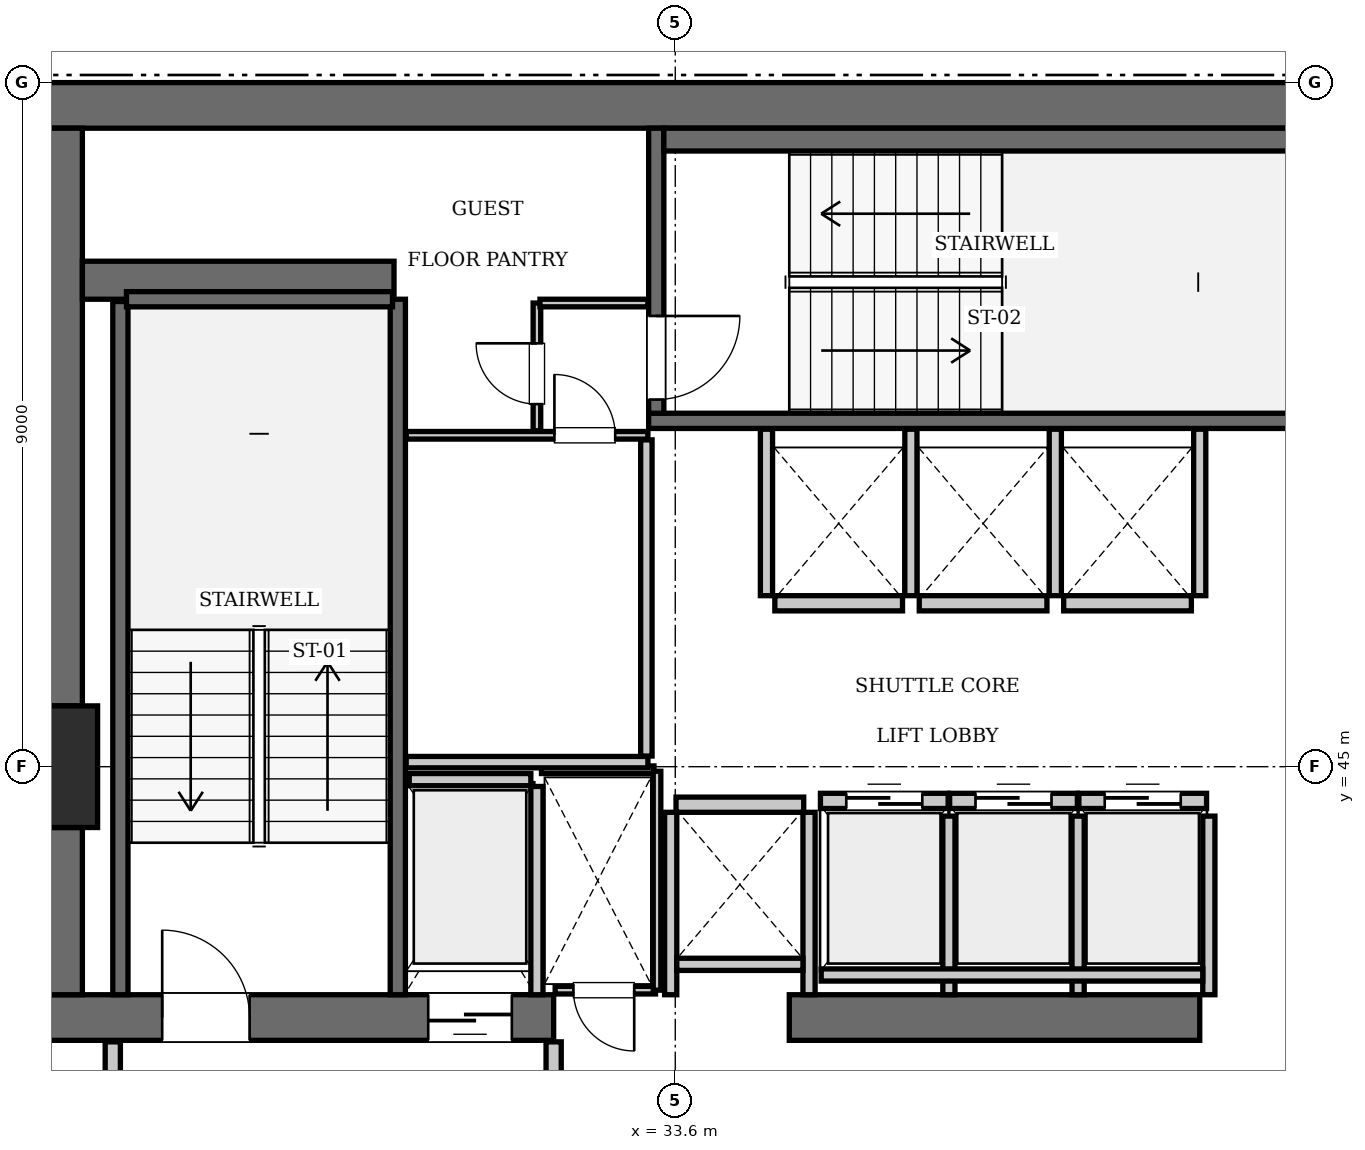
"""IFC4 building model, lengths in metres.
Left out: names, types, materials, properties, quantities, classifications, styles, units other than length and angle.
Written with IfcOpenShell. Run it as: python <this file> out.ifc"""

import sys

from ifc_helpers import new_model, si_unit, direction, frame, frame_2d, origin, origin_2d, place, context, subcontext, project, spatial, rectangle, extrude, element, fill, save


model = new_model("IFC4")
c1 = context("Model", 3, precision=1e-05, world=origin(), true_north=direction((0.0, 1.0)))
c2 = subcontext(c1, "Body", "Model", "MODEL_VIEW")
j1 = project(units=[si_unit("LENGTHUNIT", "METRE"), si_unit("PLANEANGLEUNIT", "RADIAN")], contexts=[c1])
p1 = place(None, origin())
s1 = spatial("IfcSite", under=j1, at=p1, CompositionType="ELEMENT")
p2 = place(p1, origin())
s2 = spatial("IfcBuilding", under=s1, at=p2, CompositionType="ELEMENT")
p3 = place(p2, frame((0.0, 0.0, 297.15)))
s3 = spatial("IfcBuildingStorey", under=s2, at=p3, CompositionType="ELEMENT", Elevation=297.15)
p4 = place(p3, frame((25.2, 45.0, 0.0), z_axis=(0.0, 0.0, 1.0), x_axis=(1.0, 0.0, 0.0)))
e1 = element("IfcColumn", 1, at=p4, inside=s3, PredefinedType="COLUMN", context=c2, shape_type="SweptSolid", body=[
    extrude(rectangle(XDim=1.6, YDim=1.6, at=origin_2d()), origin(), (0.0, 0.0, 1.0), 3.85),
])
p5 = place(p3, frame((25.2, 53.7, 0.0), z_axis=(0.0, 0.0, 1.0), x_axis=(1.0, 0.0, 0.0)))
e2 = element("IfcWall", 2, at=p5, inside=s3, PredefinedType="SHEAR", context=c2, shape_type="SweptSolid", body=[
    extrude(rectangle(XDim=25.2, YDim=0.6, at=frame_2d((12.6, 0.0))), origin(), (0.0, 0.0, 1.0), 3.85),
])
p6 = place(p3, frame((25.2, 41.7, 0.0), z_axis=(0.0, 0.0, 1.0), x_axis=(1.0, 0.0, 0.0)))
e3 = element("IfcWall", 3, at=p6, inside=s3, PredefinedType="SHEAR", context=c2, shape_type="SweptSolid", body=[
    extrude(rectangle(XDim=6.8, YDim=0.6, at=frame_2d((3.4, 0.0))), origin(), (0.0, 0.0, 1.0), 3.85),
])
p7 = place(p6, frame((1.65, 0.0, 0.0)))
e4 = element("IfcOpeningElement", 4, at=p7, cuts=e3, PredefinedType="OPENING", context=c2, shape_type="SweptSolid", body=[
    extrude(rectangle(XDim=1.15, YDim=2.15, at=frame_2d((0.575, 1.075))), frame((0.0, 0.31, 0.0), z_axis=(0.0, -1.0, 0.0), x_axis=(1.0, 0.0, 0.0)), (0.0, 0.0, 1.0), 0.62),
])
p8 = place(p6, frame((5.15, 0.0, 0.0)))
e5 = element("IfcOpeningElement", 5, at=p8, cuts=e3, PredefinedType="OPENING", context=c2, shape_type="SweptSolid", body=[
    extrude(rectangle(XDim=1.1, YDim=2.2, at=frame_2d((0.55, 1.1))), frame((0.0, 0.31, 0.0), z_axis=(0.0, -1.0, 0.0), x_axis=(1.0, 0.0, 0.0)), (0.0, 0.0, 1.0), 0.62),
])
p9 = place(p3, frame((35.1, 41.7, 0.0), z_axis=(0.0, 0.0, 1.0), x_axis=(1.0, 0.0, 0.0)))
e6 = element("IfcWall", 6, at=p9, inside=s3, PredefinedType="SHEAR", context=c2, shape_type="SweptSolid", body=[
    extrude(rectangle(XDim=5.4, YDim=0.6, at=frame_2d((2.7, 0.0))), origin(), (0.0, 0.0, 1.0), 3.85),
])
p10 = place(p3, frame((25.5, 42.0, 0.0), z_axis=(0.0, 0.0, 1.0), x_axis=(0.0, 1.0, 0.0)))
e7 = element("IfcWall", 7, at=p10, inside=s3, PredefinedType="SHEAR", context=c2, shape_type="SweptSolid", body=[
    extrude(rectangle(XDim=2.2, YDim=0.6, at=frame_2d((1.1, 0.0))), origin(), (0.0, 0.0, 1.0), 3.85),
])
p11 = place(p3, frame((25.5, 45.8, 0.0), z_axis=(0.0, 0.0, 1.0), x_axis=(0.0, 1.0, 0.0)))
e8 = element("IfcWall", 8, at=p11, inside=s3, PredefinedType="SHEAR", context=c2, shape_type="SweptSolid", body=[
    extrude(rectangle(XDim=7.6, YDim=0.6, at=frame_2d((3.8, 0.0))), origin(), (0.0, 0.0, 1.0), 3.85),
])
p12 = place(p3, frame((25.8, 51.4, 0.0), z_axis=(0.0, 0.0, 1.0), x_axis=(1.0, 0.0, 0.0)))
e9 = element("IfcWall", 9, at=p12, inside=s3, PredefinedType="SHEAR", context=c2, shape_type="SweptSolid", body=[
    extrude(rectangle(XDim=4.1, YDim=0.5, at=frame_2d((2.05, 0.0))), origin(), (0.0, 0.0, 1.0), 3.85),
])
p13 = place(p3, frame((29.95, 42.0, 0.0), z_axis=(0.0, 0.0, 1.0), x_axis=(0.0, 1.0, 0.0)))
e10 = element("IfcWall", 10, at=p13, inside=s3, PredefinedType="SOLIDWALL", context=c2, shape_type="SweptSolid", body=[
    extrude(rectangle(XDim=9.15, YDim=0.2, at=frame_2d((4.575, 0.0))), origin(), (0.0, 0.0, 1.0), 3.61),
])
p14 = place(p3, frame((26.3, 42.0, 0.0), z_axis=(0.0, 0.0, 1.0), x_axis=(0.0, 1.0, 0.0)))
e11 = element("IfcWall", 11, at=p14, inside=s3, PredefinedType="SOLIDWALL", context=c2, shape_type="SweptSolid", body=[
    extrude(rectangle(XDim=9.12, YDim=0.2, at=frame_2d((4.56, 0.0))), origin(), (0.0, 0.0, 1.0), 3.61),
])
p15 = place(p3, frame((26.38, 51.15, 0.0), z_axis=(0.0, 0.0, 1.0), x_axis=(1.0, 0.0, 0.0)))
e12 = element("IfcWall", 12, at=p15, inside=s3, PredefinedType="SOLIDWALL", context=c2, shape_type="SweptSolid", body=[
    extrude(rectangle(XDim=3.5, YDim=0.2, at=frame_2d((1.75, 0.0))), origin(), (0.0, 0.0, 1.0), 3.61),
])
p16 = place(p3, frame((33.25, 49.55, 0.0), z_axis=(0.0, 0.0, 1.0), x_axis=(1.0, 0.0, 0.0)))
e13 = element("IfcWall", 13, at=p16, inside=s3, PredefinedType="SOLIDWALL", context=c2, shape_type="SweptSolid", body=[
    extrude(rectangle(XDim=9.1, YDim=0.2, at=frame_2d((4.55, 0.0))), origin(), (0.0, 0.0, 1.0), 3.61),
])
p17 = place(p3, frame((33.35, 49.65, 0.0), z_axis=(0.0, 0.0, 1.0), x_axis=(0.0, 1.0, 0.0)))
e14 = element("IfcWall", 14, at=p17, inside=s3, PredefinedType="SOLIDWALL", context=c2, shape_type="SweptSolid", body=[
    extrude(rectangle(XDim=3.75, YDim=0.2, at=frame_2d((1.875, 0.0))), origin(), (0.0, 0.0, 1.0), 3.61),
])
p18 = place(p17, frame((0.18, 0.0, 0.0)))
e15 = element("IfcOpeningElement", 15, at=p18, cuts=e14, PredefinedType="OPENING", context=c2, shape_type="SweptSolid", body=[
    extrude(rectangle(XDim=1.1, YDim=2.15, at=frame_2d((0.55, 1.075))), frame((0.0, 0.11, 0.0), z_axis=(0.0, -1.0, 0.0), x_axis=(1.0, 0.0, 0.0)), (0.0, 0.0, 1.0), 0.22),
])
p19 = place(p3, frame((33.45, 53.25, 0.0), z_axis=(0.0, 0.0, 1.0), x_axis=(1.0, 0.0, 0.0)))
e16 = element("IfcWall", 16, at=p19, inside=s3, PredefinedType="SOLIDWALL", context=c2, shape_type="SweptSolid", body=[
    extrude(rectangle(XDim=8.7, YDim=0.3, at=frame_2d((4.35, 0.0))), origin(), (0.0, 0.0, 1.0), 3.61),
])
p20 = place(p3, frame((35.51, 44.55, 0.0), z_axis=(0.0, 0.0, 1.0), x_axis=(1.0, 0.0, 0.0)))
e17 = element("IfcWall", 17, at=p20, inside=s3, PredefinedType="SOLIDWALL", context=c2, shape_type="SweptSolid", body=[
    extrude(rectangle(XDim=1.68, YDim=0.2, at=frame_2d((0.84, 0.0))), origin(), (0.0, 0.0, 1.0), 3.61),
])
p21 = place(p20, frame((0.34, 0.0, 0.0)))
e18 = element("IfcOpeningElement", 18, at=p21, cuts=e17, PredefinedType="OPENING", context=c2, shape_type="SweptSolid", body=[
    extrude(rectangle(XDim=1.0, YDim=2.15, at=frame_2d((0.5, 1.075))), frame((0.0, 0.11, 0.0), z_axis=(0.0, -1.0, 0.0), x_axis=(1.0, 0.0, 0.0)), (0.0, 0.0, 1.0), 0.22),
])
p22 = place(p3, frame((37.21, 44.55, 0.0), z_axis=(0.0, 0.0, 1.0), x_axis=(1.0, 0.0, 0.0)))
e19 = element("IfcWall", 19, at=p22, inside=s3, PredefinedType="SOLIDWALL", context=c2, shape_type="SweptSolid", body=[
    extrude(rectangle(XDim=1.68, YDim=0.2, at=frame_2d((0.84, 0.0))), origin(), (0.0, 0.0, 1.0), 3.61),
])
p23 = place(p22, frame((0.34, 0.0, 0.0)))
e20 = element("IfcOpeningElement", 20, at=p23, cuts=e19, PredefinedType="OPENING", context=c2, shape_type="SweptSolid", body=[
    extrude(rectangle(XDim=1.0, YDim=2.15, at=frame_2d((0.5, 1.075))), frame((0.0, 0.11, 0.0), z_axis=(0.0, -1.0, 0.0), x_axis=(1.0, 0.0, 0.0)), (0.0, 0.0, 1.0), 0.22),
])
p24 = place(p3, frame((38.91, 44.55, 0.0), z_axis=(0.0, 0.0, 1.0), x_axis=(1.0, 0.0, 0.0)))
e21 = element("IfcWall", 21, at=p24, inside=s3, PredefinedType="SOLIDWALL", context=c2, shape_type="SweptSolid", body=[
    extrude(rectangle(XDim=1.68, YDim=0.2, at=frame_2d((0.84, 0.0))), origin(), (0.0, 0.0, 1.0), 3.61),
])
p25 = place(p24, frame((0.34, 0.0, 0.0)))
e22 = element("IfcOpeningElement", 22, at=p25, cuts=e21, PredefinedType="OPENING", context=c2, shape_type="SweptSolid", body=[
    extrude(rectangle(XDim=1.0, YDim=2.15, at=frame_2d((0.5, 1.075))), frame((0.0, 0.11, 0.0), z_axis=(0.0, -1.0, 0.0), x_axis=(1.0, 0.0, 0.0)), (0.0, 0.0, 1.0), 0.22),
])
p26 = place(p3, frame((34.91, 47.15, 0.0), z_axis=(0.0, 0.0, 1.0), x_axis=(1.0, 0.0, 0.0)))
e23 = element("IfcWall", 23, at=p26, inside=s3, PredefinedType="SOLIDWALL", context=c2, shape_type="SweptSolid", body=[
    extrude(rectangle(XDim=1.68, YDim=0.2, at=frame_2d((0.84, 0.0))), origin(), (0.0, 0.0, 1.0), 3.61),
])
for number, where, z_axis, x_axis in (
    (24, (36.81, 47.15, 0.0), (0.0, 0.0, 1.0), (1.0, 0.0, 0.0)),
    (25, (38.71, 47.15, 0.0), (0.0, 0.0, 1.0), (1.0, 0.0, 0.0)),
    (26, (33.61, 44.5, 0.0), (0.0, 0.0, 1.0), (1.0, 0.0, 0.0)),
):
    element("IfcWall", number, at=place(p3, frame(where, z_axis=z_axis, x_axis=x_axis)), inside=s3, PredefinedType="SOLIDWALL", context=c2, shape_type="SweptSolid", body=[
        extrude(rectangle(XDim=1.68, YDim=0.2, at=frame_2d((0.84, 0.0))), origin(), (0.0, 0.0, 1.0), 3.61),
    ])
p27 = place(p3, frame((30.1, 44.83, 0.0), z_axis=(0.0, 0.0, 1.0), x_axis=(1.0, 0.0, 0.0)))
e27 = element("IfcWall", 27, at=p27, inside=s3, PredefinedType="SOLIDWALL", context=c2, shape_type="SweptSolid", body=[
    extrude(rectangle(XDim=1.6, YDim=0.16, at=frame_2d((0.8, 0.0))), origin(), (0.0, 0.0, 1.0), 3.61),
])
p28 = place(p3, frame((31.78, 42.0, 0.0), z_axis=(0.0, 0.0, 1.0), x_axis=(0.0, 1.0, 0.0)))
e28 = element("IfcWall", 28, at=p28, inside=s3, PredefinedType="SOLIDWALL", context=c2, shape_type="SweptSolid", body=[
    extrude(rectangle(XDim=2.74, YDim=0.16, at=frame_2d((1.37, 0.0))), origin(), (0.0, 0.0, 1.0), 3.61),
])
for number, where, z_axis, x_axis in (
    (29, (37.2, 42.0, 0.0), (0.0, 0.0, 1.0), (0.0, 1.0, 0.0)),
    (30, (38.9, 42.0, 0.0), (0.0, 0.0, 1.0), (0.0, 1.0, 0.0)),
    (31, (40.62, 42.0, 0.0), (0.0, 0.0, 1.0), (0.0, 1.0, 0.0)),
):
    element("IfcWall", number, at=place(p3, frame(where, z_axis=z_axis, x_axis=x_axis)), inside=s3, PredefinedType="SOLIDWALL", context=c2, shape_type="SweptSolid", body=[
        extrude(rectangle(XDim=2.35, YDim=0.16, at=frame_2d((1.175, 0.0))), origin(), (0.0, 0.0, 1.0), 3.61),
    ])
p29 = place(p3, frame((35.52, 42.26, 0.0), z_axis=(0.0, 0.0, 1.0), x_axis=(1.0, 0.0, 0.0)))
e32 = element("IfcWall", 32, at=p29, inside=s3, PredefinedType="SOLIDWALL", context=c2, shape_type="SweptSolid", body=[
    extrude(rectangle(XDim=5.02, YDim=0.16, at=frame_2d((2.51, 0.0))), origin(), (0.0, 0.0, 1.0), 3.61),
])
for number, where, z_axis, x_axis in (
    (33, (34.8, 47.25, 0.0), (0.0, 0.0, 1.0), (0.0, 1.0, 0.0)),
    (34, (36.7, 47.25, 0.0), (0.0, 0.0, 1.0), (0.0, 1.0, 0.0)),
    (35, (38.6, 47.25, 0.0), (0.0, 0.0, 1.0), (0.0, 1.0, 0.0)),
    (36, (40.5, 47.25, 0.0), (0.0, 0.0, 1.0), (0.0, 1.0, 0.0)),
):
    element("IfcWall", number, at=place(p3, frame(where, z_axis=z_axis, x_axis=x_axis)), inside=s3, PredefinedType="SOLIDWALL", context=c2, shape_type="SweptSolid", body=[
        extrude(rectangle(XDim=2.19, YDim=0.16, at=frame_2d((1.095, 0.0))), origin(), (0.0, 0.0, 1.0), 3.61),
    ])
for number, where, z_axis, x_axis in (
    (37, (33.54, 42.0, 0.0), (0.0, 0.0, 1.0), (0.0, 1.0, 0.0)),
    (38, (35.36, 42.0, 0.0), (0.0, 0.0, 1.0), (0.0, 1.0, 0.0)),
):
    element("IfcWall", number, at=place(p3, frame(where, z_axis=z_axis, x_axis=x_axis)), inside=s3, PredefinedType="SOLIDWALL", context=c2, shape_type="SweptSolid", body=[
        extrude(rectangle(XDim=2.4, YDim=0.16, at=frame_2d((1.2, 0.0))), origin(), (0.0, 0.0, 1.0), 3.61),
    ])
p30 = place(p3, frame((33.62, 42.4, 0.0), z_axis=(0.0, 0.0, 1.0), x_axis=(1.0, 0.0, 0.0)))
e39 = element("IfcWall", 39, at=p30, inside=s3, PredefinedType="SOLIDWALL", context=c2, shape_type="SweptSolid", body=[
    extrude(rectangle(XDim=1.66, YDim=0.16, at=frame_2d((0.83, 0.0))), origin(), (0.0, 0.0, 1.0), 3.61),
])
for number, where, z_axis, x_axis in (
    (40, (26.2, 38.31, 0.0), (0.0, 0.0, 1.0), (0.0, 1.0, 0.0)),
    (41, (32.0, 38.31, 0.0), (0.0, 0.0, 1.0), (0.0, 1.0, 0.0)),
):
    element("IfcWall", number, at=place(p3, frame(where, z_axis=z_axis, x_axis=x_axis)), inside=s3, PredefinedType="PARTITIONING", context=c2, shape_type="SweptSolid", body=[
        extrude(rectangle(XDim=3.07, YDim=0.2, at=frame_2d((1.535, 0.0))), origin(), (0.0, 0.0, 1.0), 3.61),
    ])
p31 = place(p3, frame((32.02, 42.06, 0.0), z_axis=(0.0, 0.0, 1.0), x_axis=(1.0, 0.0, 0.0)))
e42 = element("IfcWall", 42, at=p31, inside=s3, PredefinedType="PARTITIONING", context=c2, shape_type="SweptSolid", body=[
    extrude(rectangle(XDim=1.32, YDim=0.1, at=frame_2d((0.66, 0.0))), origin(), (0.0, 0.0, 1.0), 3.61),
])
p32 = place(p31, frame((0.24, 0.0, 0.0)))
e43 = element("IfcOpeningElement", 43, at=p32, cuts=e42, PredefinedType="OPENING", context=c2, shape_type="SweptSolid", body=[
    extrude(rectangle(XDim=0.8, YDim=2.05, at=frame_2d((0.4, 1.025))), frame((0.0, 0.06, 0.0), z_axis=(0.0, -1.0, 0.0), x_axis=(1.0, 0.0, 0.0)), (0.0, 0.0, 1.0), 0.12),
])
p33 = place(p3, frame((31.84, 44.96, 0.0), z_axis=(0.0, 0.0, 1.0), x_axis=(1.0, 0.0, 0.0)))
e44 = element("IfcWall", 44, at=p33, inside=s3, PredefinedType="PARTITIONING", context=c2, shape_type="SweptSolid", body=[
    extrude(rectangle(XDim=1.48, YDim=0.1, at=frame_2d((0.74, 0.0))), origin(), (0.0, 0.0, 1.0), 3.61),
])
p34 = place(p3, frame((33.36, 42.06, 0.0), z_axis=(0.0, 0.0, 1.0), x_axis=(0.0, 1.0, 0.0)))
e45 = element("IfcWall", 45, at=p34, inside=s3, PredefinedType="PARTITIONING", context=c2, shape_type="SweptSolid", body=[
    extrude(rectangle(XDim=2.88, YDim=0.1, at=frame_2d((1.44, 0.0))), origin(), (0.0, 0.0, 1.0), 3.61),
])
p35 = place(p3, frame((30.06, 45.06, 0.0), z_axis=(0.0, 0.0, 1.0), x_axis=(1.0, 0.0, 0.0)))
e46 = element("IfcWall", 46, at=p35, inside=s3, PredefinedType="PARTITIONING", context=c2, shape_type="SweptSolid", body=[
    extrude(rectangle(XDim=3.18, YDim=0.15, at=frame_2d((1.59, 0.0))), origin(), (0.0, 0.0, 1.0), 3.61),
])
p36 = place(p3, frame((33.22, 45.14, 0.0), z_axis=(0.0, 0.0, 1.0), x_axis=(0.0, 1.0, 0.0)))
e47 = element("IfcWall", 47, at=p36, inside=s3, PredefinedType="PARTITIONING", context=c2, shape_type="SweptSolid", body=[
    extrude(rectangle(XDim=4.16, YDim=0.15, at=frame_2d((2.08, 0.0))), origin(), (0.0, 0.0, 1.0), 3.61),
])
p37 = place(p3, frame((30.06, 49.36, 0.0), z_axis=(0.0, 0.0, 1.0), x_axis=(1.0, 0.0, 0.0)))
e48 = element("IfcWall", 48, at=p37, inside=s3, PredefinedType="PARTITIONING", context=c2, shape_type="SweptSolid", body=[
    extrude(rectangle(XDim=3.18, YDim=0.1, at=frame_2d((1.59, 0.0))), origin(), (0.0, 0.0, 1.0), 3.61),
])
p38 = place(p37, frame((1.95, 0.0, 0.0)))
e49 = element("IfcOpeningElement", 49, at=p38, cuts=e48, PredefinedType="OPENING", context=c2, shape_type="SweptSolid", body=[
    extrude(rectangle(XDim=0.8, YDim=2.05, at=frame_2d((0.4, 1.025))), frame((0.0, 0.06, 0.0), z_axis=(0.0, -1.0, 0.0), x_axis=(1.0, 0.0, 0.0)), (0.0, 0.0, 1.0), 0.12),
])
p39 = place(p3, frame((31.78, 49.42, 0.0), z_axis=(0.0, 0.0, 1.0), x_axis=(0.0, 1.0, 0.0)))
e50 = element("IfcWall", 50, at=p39, inside=s3, PredefinedType="PARTITIONING", context=c2, shape_type="SweptSolid", body=[
    extrude(rectangle(XDim=1.68, YDim=0.1, at=frame_2d((0.84, 0.0))), origin(), (0.0, 0.0, 1.0), 3.61),
])
p40 = place(p39, frame((0.35, 0.0, 0.0)))
e51 = element("IfcOpeningElement", 51, at=p40, cuts=e50, PredefinedType="OPENING", context=c2, shape_type="SweptSolid", body=[
    extrude(rectangle(XDim=0.8, YDim=2.05, at=frame_2d((0.4, 1.025))), frame((0.0, 0.06, 0.0), z_axis=(0.0, -1.0, 0.0), x_axis=(1.0, 0.0, 0.0)), (0.0, 0.0, 1.0), 0.12),
])
p41 = place(p3, frame((31.82, 51.1, 0.0), z_axis=(0.0, 0.0, 1.0), x_axis=(1.0, 0.0, 0.0)))
e52 = element("IfcWall", 52, at=p41, inside=s3, PredefinedType="PARTITIONING", context=c2, shape_type="SweptSolid", body=[
    extrude(rectangle(XDim=1.42, YDim=0.1, at=frame_2d((0.71, 0.0))), origin(), (0.0, 0.0, 1.0), 3.61),
])
p42 = place(p7, origin())
e53 = element("IfcDoor", 53, at=p42, inside=s3, OperationType="SINGLE_SWING_LEFT", PredefinedType="DOOR", context=c2, shape_type="SweptSolid", body=[
    extrude(rectangle(XDim=1.15, YDim=2.15, at=frame_2d((0.575, 1.075))), frame((0.0, 0.025, 0.0), z_axis=(0.0, -1.0, 0.0), x_axis=(1.0, 0.0, 0.0)), (0.0, 0.0, 1.0), 0.05),
])
fill(e4, e53)
p43 = place(p18, frame((1.1, 0.0, 0.0), z_axis=(0.0, 0.0, 1.0), x_axis=(-1.0, 0.0, 0.0)))
e54 = element("IfcDoor", 54, at=p43, inside=s3, OperationType="SINGLE_SWING_LEFT", PredefinedType="DOOR", context=c2, shape_type="SweptSolid", body=[
    extrude(rectangle(XDim=1.1, YDim=2.15, at=frame_2d((0.55, 1.075))), frame((0.0, 0.025, 0.0), z_axis=(0.0, -1.0, 0.0), x_axis=(1.0, 0.0, 0.0)), (0.0, 0.0, 1.0), 0.05),
])
fill(e15, e54)
p44 = place(p21, origin())
e55 = element("IfcDoor", 55, at=p44, inside=s3, OperationType="SLIDING_TO_LEFT", PredefinedType="DOOR", context=c2, shape_type="SweptSolid", body=[
    extrude(rectangle(XDim=1.0, YDim=2.15, at=frame_2d((0.5, 1.075))), frame((0.0, 0.025, 0.0), z_axis=(0.0, -1.0, 0.0), x_axis=(1.0, 0.0, 0.0)), (0.0, 0.0, 1.0), 0.05),
])
fill(e18, e55)
p45 = place(p23, origin())
e56 = element("IfcDoor", 56, at=p45, inside=s3, OperationType="SLIDING_TO_LEFT", PredefinedType="DOOR", context=c2, shape_type="SweptSolid", body=[
    extrude(rectangle(XDim=1.0, YDim=2.15, at=frame_2d((0.5, 1.075))), frame((0.0, 0.025, 0.0), z_axis=(0.0, -1.0, 0.0), x_axis=(1.0, 0.0, 0.0)), (0.0, 0.0, 1.0), 0.05),
])
fill(e20, e56)
p46 = place(p25, origin())
e57 = element("IfcDoor", 57, at=p46, inside=s3, OperationType="SLIDING_TO_LEFT", PredefinedType="DOOR", context=c2, shape_type="SweptSolid", body=[
    extrude(rectangle(XDim=1.0, YDim=2.15, at=frame_2d((0.5, 1.075))), frame((0.0, 0.025, 0.0), z_axis=(0.0, -1.0, 0.0), x_axis=(1.0, 0.0, 0.0)), (0.0, 0.0, 1.0), 0.05),
])
fill(e22, e57)
p47 = place(p8, frame((1.1, 0.0, 0.0), z_axis=(0.0, 0.0, 1.0), x_axis=(-1.0, 0.0, 0.0)))
e58 = element("IfcDoor", 58, at=p47, inside=s3, OperationType="SLIDING_TO_LEFT", PredefinedType="DOOR", context=c2, shape_type="SweptSolid", body=[
    extrude(rectangle(XDim=1.1, YDim=2.2, at=frame_2d((0.55, 1.1))), frame((0.0, 0.025, 0.0), z_axis=(0.0, -1.0, 0.0), x_axis=(1.0, 0.0, 0.0)), (0.0, 0.0, 1.0), 0.05),
])
fill(e5, e58)
p48 = place(p32, frame((0.8, 0.0, 0.0), z_axis=(0.0, 0.0, 1.0), x_axis=(-1.0, 0.0, 0.0)))
e59 = element("IfcDoor", 59, at=p48, inside=s3, OperationType="SINGLE_SWING_LEFT", PredefinedType="DOOR", context=c2, shape_type="SweptSolid", body=[
    extrude(rectangle(XDim=0.8, YDim=2.05, at=frame_2d((0.4, 1.025))), frame((0.0, 0.025, 0.0), z_axis=(0.0, -1.0, 0.0), x_axis=(1.0, 0.0, 0.0)), (0.0, 0.0, 1.0), 0.05),
])
fill(e43, e59)
p49 = place(p38, origin())
e60 = element("IfcDoor", 60, at=p49, inside=s3, OperationType="SINGLE_SWING_LEFT", PredefinedType="DOOR", context=c2, shape_type="SweptSolid", body=[
    extrude(rectangle(XDim=0.8, YDim=2.05, at=frame_2d((0.4, 1.025))), frame((0.0, 0.025, 0.0), z_axis=(0.0, -1.0, 0.0), x_axis=(1.0, 0.0, 0.0)), (0.0, 0.0, 1.0), 0.05),
])
fill(e49, e60)
p50 = place(p40, origin())
e61 = element("IfcDoor", 61, at=p50, inside=s3, OperationType="SINGLE_SWING_RIGHT", PredefinedType="DOOR", context=c2, shape_type="SweptSolid", body=[
    extrude(rectangle(XDim=0.8, YDim=2.05, at=frame_2d((0.4, 1.025))), frame((0.0, 0.025, 0.0), z_axis=(0.0, -1.0, 0.0), x_axis=(1.0, 0.0, 0.0)), (0.0, 0.0, 1.0), 0.05),
])
fill(e51, e61)
save(model, sys.argv[1])
